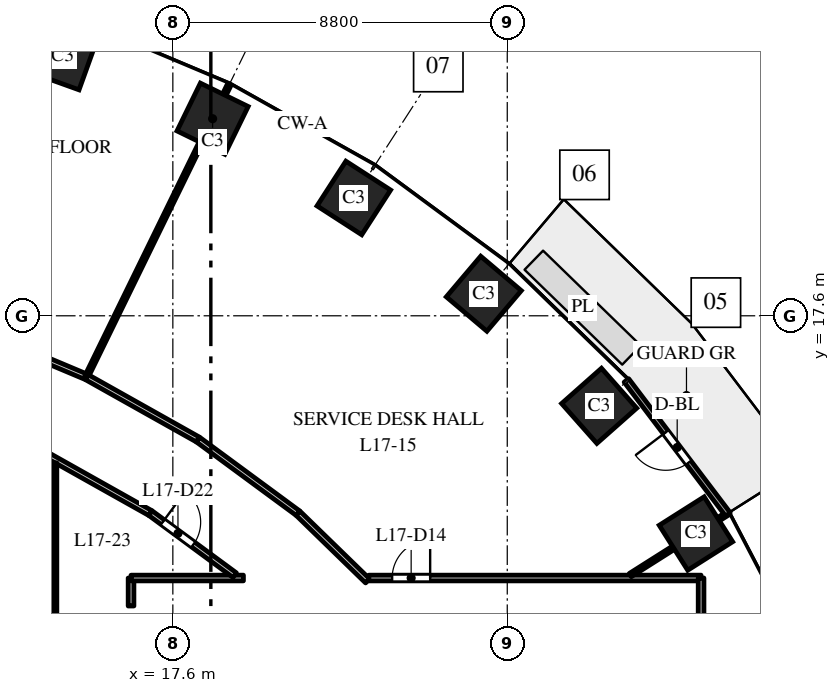
"""IFC4 building model, lengths in metres.
Left out: names, types, materials, properties, quantities, classifications, styles, units other than length and angle.
Written with IfcOpenShell. Run it as: python <this file> out.ifc"""

import sys

from ifc_helpers import new_model, si_unit, direction, frame, frame_2d, origin, origin_2d, place, context, subcontext, project, spatial, rectangle, extrude, element, fill, save


model = new_model("IFC4")
c1 = context("Model", 3, precision=1e-05, world=origin(), true_north=direction((0.0, 1.0)))
c2 = subcontext(c1, "Body", "Model", "MODEL_VIEW")
j1 = project(units=[si_unit("LENGTHUNIT", "METRE"), si_unit("PLANEANGLEUNIT", "RADIAN")], contexts=[c1])
p1 = place(None, origin())
s1 = spatial("IfcSite", under=j1, at=p1, CompositionType="ELEMENT")
p2 = place(p1, origin())
s2 = spatial("IfcBuilding", under=s1, at=p2, CompositionType="ELEMENT")
p3 = place(p2, frame((0.0, 0.0, 78.5)))
s3 = spatial("IfcBuildingStorey", under=s2, at=p3, CompositionType="ELEMENT", Elevation=78.5)
for number, where, z_axis, x_axis in (
    (1, (31.365, 11.871, 0.0), (0.0, 0.0, 1.0), (-0.535, 0.845, 0.0)),
    (2, (28.819, 15.23, 0.0), (0.0, 0.0, 1.0), (-0.663, 0.749, 0.0)),
    (3, (25.783, 18.18, 0.0), (0.0, 0.0, 1.0), (-0.763, 0.646, 0.0)),
    (4, (22.362, 20.7, 0.0), (0.0, 0.0, 1.0), (-0.84, 0.542, 0.0)),
    (5, (18.646, 22.785, 0.0), (0.0, 0.0, 1.0), (-0.898, 0.439, 0.0)),
    (6, (14.709, 24.441, 0.0), (0.0, 0.0, 1.0), (-0.941, 0.338, 0.0)),
):
    element("IfcColumn", number, at=place(p3, frame(where, z_axis=z_axis, x_axis=x_axis)), inside=s3, PredefinedType="COLUMN", context=c2, shape_type="SweptSolid", body=[
        extrude(rectangle(XDim=1.4, YDim=1.4, at=origin_2d()), origin(), (0.0, 0.0, 1.0), 4.0),
    ])
p4 = place(p3, frame((32.208, 12.374, 0.0), z_axis=(0.0, 0.0, 1.0), x_axis=(-0.604045763106, 0.796949632081, 0.0)))
e7 = element("IfcWall", 7, at=p4, inside=s3, PredefinedType="STANDARD", context=c2, shape_type="SweptSolid", body=[
    extrude(rectangle(XDim=4.423, YDim=0.15, at=frame_2d((2.212, 0.0))), origin(), (0.0, 0.0, 1.0), 3.7),
])
p5 = place(p4, frame((1.712, 0.0, 0.0)))
e8 = element("IfcOpeningElement", 8, at=p5, cuts=e7, PredefinedType="OPENING", context=c2, shape_type="SweptSolid", body=[
    extrude(rectangle(XDim=1.0, YDim=2.4, at=frame_2d((0.5, 1.2))), frame((0.0, 0.085, 0.0), z_axis=(0.0, -1.0, 0.0), x_axis=(1.0, 0.0, 0.0)), (0.0, 0.0, 1.0), 0.17),
])
p6 = place(p3, frame((12.151, 17.326, 0.0), z_axis=(0.0, 0.0, 1.0), x_axis=(0.921891448612, -0.387448263612, 0.0)))
e9 = element("IfcWall", 9, at=p6, inside=s3, PredefinedType="PARTITIONING", context=c2, shape_type="SweptSolid", body=[
    extrude(rectangle(XDim=3.443, YDim=0.15, at=frame_2d((1.722, 0.0))), origin(), (0.0, 0.0, 1.0), 3.7),
])
p7 = place(p3, frame((14.313, 13.922, 0.0), z_axis=(0.0, 0.0, 1.0), x_axis=(0.871977874087, -0.489545286059, 0.0)))
e10 = element("IfcWall", 10, at=p7, inside=s3, PredefinedType="PARTITIONING", context=c2, shape_type="SweptSolid", body=[
    extrude(rectangle(XDim=3.093, YDim=0.15, at=frame_2d((1.546, 0.0))), origin(), (0.0, 0.0, 1.0), 3.7),
])
p8 = place(p3, frame((14.497, 9.075, 0.0), z_axis=(0.0, 0.0, 1.0), x_axis=(0.0, 1.0, 0.0)))
e11 = element("IfcWall", 11, at=p8, inside=s3, PredefinedType="PARTITIONING", context=c2, shape_type="SweptSolid", body=[
    extrude(rectangle(XDim=4.654, YDim=0.1, at=frame_2d((2.327, 0.0))), origin(), (0.0, 0.0, 1.0), 3.7),
])
p9 = place(p3, frame((15.326, 15.995, 0.0), z_axis=(0.0, 0.0, 1.0), x_axis=(0.439255658574, 0.898362102056, 0.0)))
e12 = element("IfcWall", 12, at=p9, inside=s3, PredefinedType="PARTITIONING", context=c2, shape_type="SweptSolid", body=[
    extrude(rectangle(XDim=8.56, YDim=0.1, at=frame_2d((4.28, 0.0))), origin(), (0.0, 0.0, 1.0), 2.85),
])
p10 = place(p3, frame((15.342, 15.982, 0.0), z_axis=(0.0, 0.0, 1.0), x_axis=(0.872011649609, -0.48948512025, 0.0)))
e13 = element("IfcWall", 13, at=p10, inside=s3, PredefinedType="PARTITIONING", context=c2, shape_type="SweptSolid", body=[
    extrude(rectangle(XDim=3.346, YDim=0.15, at=frame_2d((1.673, 0.0))), origin(), (0.0, 0.0, 1.0), 3.7),
])
p11 = place(p3, frame((16.5, 9.964, 0.0), z_axis=(0.0, 0.0, 1.0), x_axis=(0.0, 1.0, 0.0)))
e14 = element("IfcWall", 14, at=p11, inside=s3, PredefinedType="PARTITIONING", context=c2, shape_type="SweptSolid", body=[
    extrude(rectangle(XDim=0.736, YDim=0.15, at=frame_2d((0.368, 0.0))), origin(), (0.0, 0.0, 1.0), 3.7),
])
p12 = place(p3, frame((16.5, 10.7, 0.0), z_axis=(0.0, 0.0, 1.0), x_axis=(1.0, 0.0, 0.0)))
e15 = element("IfcWall", 15, at=p12, inside=s3, PredefinedType="PARTITIONING", context=c2, shape_type="SweptSolid", body=[
    extrude(rectangle(XDim=2.957, YDim=0.15, at=frame_2d((1.479, 0.0))), origin(), (0.0, 0.0, 1.0), 3.7),
])
p13 = place(p3, frame((17.01, 12.408, 0.0), z_axis=(0.0, 0.0, 1.0), x_axis=(0.805276342361, -0.592899664728, 0.0)))
e16 = element("IfcWall", 16, at=p13, inside=s3, PredefinedType="PARTITIONING", context=c2, shape_type="SweptSolid", body=[
    extrude(rectangle(XDim=2.754, YDim=0.15, at=frame_2d((1.377, 0.0))), origin(), (0.0, 0.0, 1.0), 3.7),
])
p14 = place(p13, frame((0.4, 0.0, 0.0)))
e17 = element("IfcOpeningElement", 17, at=p14, cuts=e16, PredefinedType="OPENING", context=c2, shape_type="SweptSolid", body=[
    extrude(rectangle(XDim=1.0, YDim=2.1, at=frame_2d((0.5, 1.05))), frame((0.0, 0.085, 0.0), z_axis=(0.0, -1.0, 0.0), x_axis=(1.0, 0.0, 0.0)), (0.0, 0.0, 1.0), 0.17),
])
p15 = place(p3, frame((18.26, 14.344, 0.0), z_axis=(0.0, 0.0, 1.0), x_axis=(0.805303685339, -0.592862525701, 0.0)))
e18 = element("IfcWall", 18, at=p15, inside=s3, PredefinedType="PARTITIONING", context=c2, shape_type="SweptSolid", body=[
    extrude(rectangle(XDim=3.267, YDim=0.15, at=frame_2d((1.634, 0.0))), origin(), (0.0, 0.0, 1.0), 3.7),
])
p16 = place(p3, frame((20.891, 12.407, 0.0), z_axis=(0.0, 0.0, 1.0), x_axis=(0.71701613235, -0.697056572991, 0.0)))
e19 = element("IfcWall", 19, at=p16, inside=s3, PredefinedType="PARTITIONING", context=c2, shape_type="SweptSolid", body=[
    extrude(rectangle(XDim=2.556, YDim=0.15, at=frame_2d((1.278, 0.0))), origin(), (0.0, 0.0, 1.0), 2.75),
])
p17 = place(p3, frame((22.755, 10.7, 0.0), z_axis=(0.0, 0.0, 1.0), x_axis=(1.0, 0.0, 0.0)))
e20 = element("IfcWall", 20, at=p17, inside=s3, PredefinedType="PARTITIONING", context=c2, shape_type="SweptSolid", body=[
    extrude(rectangle(XDim=8.745, YDim=0.15, at=frame_2d((4.373, 0.0))), origin(), (0.0, 0.0, 1.0), 2.85),
])
p18 = place(p17, frame((0.616, 0.0, 0.0)))
e21 = element("IfcOpeningElement", 21, at=p18, cuts=e20, PredefinedType="OPENING", context=c2, shape_type="SweptSolid", body=[
    extrude(rectangle(XDim=1.0, YDim=2.1, at=frame_2d((0.5, 1.05))), frame((0.0, 0.085, 0.0), z_axis=(0.0, -1.0, 0.0), x_axis=(1.0, 0.0, 0.0)), (0.0, 0.0, 1.0), 0.17),
])
p19 = place(p3, frame((29.637, 10.777, 0.0), z_axis=(0.0, 0.0, 1.0), x_axis=(0.844810627195, 0.535065420467, 0.0)))
e22 = element("IfcWall", 22, at=p19, inside=s3, PredefinedType="PARTITIONING", context=c2, shape_type="SweptSolid", body=[
    extrude(rectangle(XDim=3.048, YDim=0.1, at=frame_2d((1.524, 0.0))), origin(), (0.0, 0.0, 1.0), 2.85),
])
p20 = place(p3, frame((31.5, 8.5, 0.0), z_axis=(0.0, 0.0, 1.0), x_axis=(0.0, 1.0, 0.0)))
e23 = element("IfcWall", 23, at=p20, inside=s3, PredefinedType="PARTITIONING", context=c2, shape_type="SweptSolid", body=[
    extrude(rectangle(XDim=2.2, YDim=0.15, at=frame_2d((1.1, 0.0))), origin(), (0.0, 0.0, 1.0), 2.85),
])
p21 = place(p5, origin())
e24 = element("IfcDoor", 24, at=p21, inside=s3, OperationType="SINGLE_SWING_RIGHT", PredefinedType="DOOR", context=c2, shape_type="SweptSolid", body=[
    extrude(rectangle(XDim=1.0, YDim=2.4, at=frame_2d((0.5, 1.2))), frame((0.0, 0.025, 0.0), z_axis=(0.0, -1.0, 0.0), x_axis=(1.0, 0.0, 0.0)), (0.0, 0.0, 1.0), 0.05),
])
fill(e8, e24)
p22 = place(p18, origin())
e25 = element("IfcDoor", 25, at=p22, inside=s3, OperationType="SINGLE_SWING_RIGHT", PredefinedType="DOOR", context=c2, shape_type="SweptSolid", body=[
    extrude(rectangle(XDim=1.0, YDim=2.1, at=frame_2d((0.5, 1.05))), frame((0.0, 0.025, 0.0), z_axis=(0.0, -1.0, 0.0), x_axis=(1.0, 0.0, 0.0)), (0.0, 0.0, 1.0), 0.05),
])
fill(e21, e25)
p23 = place(p14, origin())
e26 = element("IfcDoor", 26, at=p23, inside=s3, OperationType="SINGLE_SWING_LEFT", PredefinedType="DOOR", context=c2, shape_type="SweptSolid", body=[
    extrude(rectangle(XDim=1.0, YDim=2.1, at=frame_2d((0.5, 1.05))), frame((0.0, 0.025, 0.0), z_axis=(0.0, -1.0, 0.0), x_axis=(1.0, 0.0, 0.0)), (0.0, 0.0, 1.0), 0.05),
])
fill(e17, e26)
save(model, sys.argv[1])
